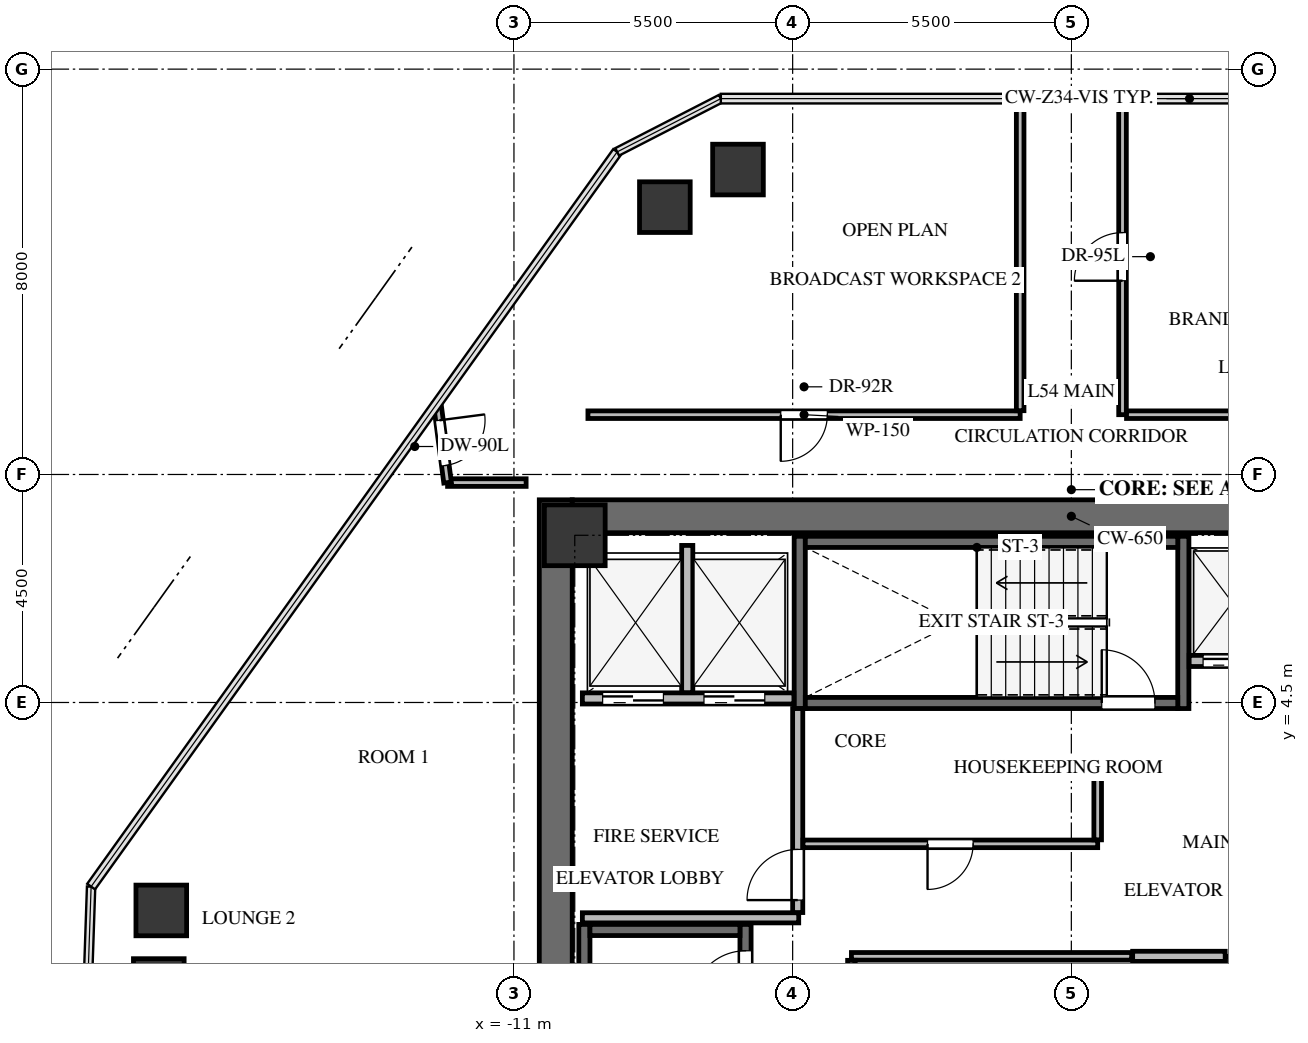
"""IFC4 building model, lengths in metres.
Left out: names, types, materials, properties, quantities, classifications, styles, units other than length and angle.
Written with IfcOpenShell. Run it as: python <this file> out.ifc"""

import sys

from ifc_helpers import new_model, si_unit, direction, frame, frame_2d, origin, origin_2d, place, context, subcontext, project, spatial, rectangle, extrude, source, transform, mapped, element, fill, save


model = new_model("IFC4")
c1 = context("Model", 3, precision=1e-05, world=origin(), true_north=direction((0.0, 1.0)))
c2 = subcontext(c1, "Body", "Model", "MODEL_VIEW")
j1 = project(units=[si_unit("LENGTHUNIT", "METRE"), si_unit("PLANEANGLEUNIT", "RADIAN")], contexts=[c1])
p1 = place(None, origin())
s1 = spatial("IfcSite", under=j1, at=p1, CompositionType="ELEMENT")
p2 = place(p1, origin())
s2 = spatial("IfcBuilding", under=s1, at=p2, CompositionType="ELEMENT")
p3 = place(p2, frame((0.0, 0.0, 196.9)))
s3 = spatial("IfcBuildingStorey", under=s2, at=p3, CompositionType="ELEMENT", Elevation=196.9)
p4 = place(p3, frame((-10.175, -8.5, 0.0), z_axis=(0.0, 0.0, 1.0), x_axis=(0.0, 1.0, 0.0)))
e1 = element("IfcWall", 1, at=p4, inside=s3, PredefinedType="SHEAR", context=c2, shape_type="SweptSolid", body=[
    extrude(rectangle(XDim=17.0, YDim=0.65, at=frame_2d((8.5, 0.0))), origin(), (0.0, 0.0, 1.0), 3.3),
])
p5 = place(p3, frame((-9.85, 8.175, 0.0), z_axis=(0.0, 0.0, 1.0), x_axis=(1.0, 0.0, 0.0)))
e2 = element("IfcWall", 2, at=p5, inside=s3, PredefinedType="SHEAR", context=c2, shape_type="SweptSolid", body=[
    extrude(rectangle(XDim=19.7, YDim=0.65, at=frame_2d((9.85, 0.0))), origin(), (0.0, 0.0, 1.0), 3.3),
])
p6 = place(p3, frame((-6.43, -7.77, -0.24), z_axis=(0.0, 0.0, 1.0), x_axis=(0.0, 1.0, 0.0)))
e3 = element("IfcWall", 3, at=p6, inside=s3, PredefinedType="SHEAR", context=c2, shape_type="SweptSolid", body=[
    extrude(rectangle(XDim=7.89, YDim=0.22, at=frame_2d((3.945, 0.0))), origin(), (0.0, 0.0, 1.0), 3.3),
])
p7 = place(p6, frame((6.32, 0.0, 0.0)))
e4 = element("IfcOpeningElement", 4, at=p7, cuts=e3, PredefinedType="OPENING", context=c2, shape_type="SweptSolid", body=[
    extrude(rectangle(XDim=1.05, YDim=2.15, at=frame_2d((0.525, 1.075))), frame((0.0, 0.12, 0.0), z_axis=(0.0, -1.0, 0.0), x_axis=(1.0, 0.0, 0.0)), (0.0, 0.0, 1.0), 0.24),
])
p8 = place(p3, frame((-9.61, 0.12, -0.24), z_axis=(0.0, 0.0, 1.0), x_axis=(0.0, -1.0, 0.0)))
e5 = element("IfcWall", 5, at=p8, inside=s3, PredefinedType="SHEAR", context=c2, shape_type="SweptSolid", body=[
    extrude(rectangle(XDim=7.89, YDim=0.22, at=frame_2d((3.945, 0.0))), origin(), (0.0, 0.0, 1.0), 3.3),
])
p9 = place(p3, frame((-6.54, 0.01, -0.24), z_axis=(0.0, 0.0, 1.0), x_axis=(-1.0, 0.0, 0.0)))
e6 = element("IfcWall", 6, at=p9, inside=s3, PredefinedType="SHEAR", context=c2, shape_type="SweptSolid", body=[
    extrude(rectangle(XDim=2.96, YDim=0.22, at=frame_2d((1.48, 0.0))), origin(), (0.0, 0.0, 1.0), 3.3),
])
for number, where, z_axis, x_axis in (
    (7, (2.21, 4.38, -0.24), (0.0, 0.0, 1.0), (0.0, 1.0, 0.0)),
    (8, (-5.36, 7.78, -0.24), (0.0, 0.0, 1.0), (0.0, -1.0, 0.0)),
):
    element("IfcWall", number, at=place(p3, frame(where, z_axis=z_axis, x_axis=x_axis)), inside=s3, PredefinedType="SHEAR", context=c2, shape_type="SweptSolid", body=[
        extrude(rectangle(XDim=3.4, YDim=0.22, at=frame_2d((1.7, 0.0))), origin(), (0.0, 0.0, 1.0), 3.3),
    ])
p10 = place(p3, frame((-5.25, 4.49, -0.24), z_axis=(0.0, 0.0, 1.0), x_axis=(1.0, 0.0, 0.0)))
e9 = element("IfcWall", 9, at=p10, inside=s3, PredefinedType="SHEAR", context=c2, shape_type="SweptSolid", body=[
    extrude(rectangle(XDim=7.35, YDim=0.22, at=frame_2d((3.675, 0.0))), origin(), (0.0, 0.0, 1.0), 3.3),
])
p11 = place(p10, frame((5.85, 0.0, 0.0)))
e10 = element("IfcOpeningElement", 10, at=p11, cuts=e9, PredefinedType="OPENING", context=c2, shape_type="SweptSolid", body=[
    extrude(rectangle(XDim=1.05, YDim=2.15, at=frame_2d((0.525, 1.075))), frame((0.0, 0.12, 0.0), z_axis=(0.0, -1.0, 0.0), x_axis=(1.0, 0.0, 0.0)), (0.0, 0.0, 1.0), 0.24),
])
p12 = place(p3, frame((2.1, 7.67, -0.24), z_axis=(0.0, 0.0, 1.0), x_axis=(-1.0, 0.0, 0.0)))
e11 = element("IfcWall", 11, at=p12, inside=s3, PredefinedType="SHEAR", context=c2, shape_type="SweptSolid", body=[
    extrude(rectangle(XDim=7.35, YDim=0.22, at=frame_2d((3.675, 0.0))), origin(), (0.0, 0.0, 1.0), 3.3),
])
m1 = source(origin(), c2, "Body", "SweptSolid", [
    extrude(rectangle(XDim=1.2, YDim=1.2, at=origin_2d()), origin(), (0.0, 0.0, 1.0), 3.3),
])
p13 = place(p3, frame((-9.8, 7.8, -0.24), z_axis=(0.0, 0.0, 1.0), x_axis=(1.0, 0.0, 0.0)))
e12 = element("IfcColumn", 12, at=p13, inside=s3, PredefinedType="COLUMN", context=c2, shape_type="MappedRepresentation", body=[
    mapped(m1, transform((0.0, 0.0, 0.0), x_axis=(1.0, 0.0, 0.0), y_axis=(0.0, 1.0, 0.0), z_axis=(0.0, 0.0, 1.0), scale=1.0)),
])
m2 = source(origin(), c2, "Body", "SweptSolid", [
    extrude(rectangle(XDim=1.0, YDim=1.0, at=origin_2d()), origin(), (0.0, 0.0, 1.0), 3.3),
])
for number, where, z_axis, x_axis in (
    (13, (-18.009, -1.057, -0.24), (0.0, 0.0, 1.0), (1.0, 0.0, 0.0)),
    (14, (-17.96, 0.396, -0.24), (0.0, 0.0, 1.0), (1.0, 0.0, 0.0)),
    (15, (-8.022, 14.276, -0.24), (0.0, 0.0, 1.0), (1.0, 0.0, 0.0)),
    (16, (-6.579, 15.018, -0.24), (0.0, 0.0, 1.0), (1.0, 0.0, 0.0)),
):
    element("IfcColumn", number, at=place(p3, frame(where, z_axis=z_axis, x_axis=x_axis)), inside=s3, PredefinedType="COLUMN", context=c2, shape_type="MappedRepresentation", body=[
        mapped(m2, transform((0.0, 0.0, 0.0), x_axis=(1.0, 0.0, 0.0), y_axis=(0.0, 1.0, 0.0), z_axis=(0.0, 0.0, 1.0), scale=1.0)),
    ])
p14 = place(p3, frame((-9.65, 4.58, 0.0), z_axis=(0.0, 0.0, 1.0), x_axis=(1.0, 0.0, 0.0)))
e17 = element("IfcWall", 17, at=p14, inside=s3, PredefinedType="SOLIDWALL", context=c2, shape_type="SweptSolid", body=[
    extrude(rectangle(XDim=4.175, YDim=0.22, at=frame_2d((2.087, 0.0))), origin(), (0.0, 0.0, 1.0), 3.045),
])
p15 = place(p14, frame((0.4, 0.0, 0.0)))
e18 = element("IfcOpeningElement", 18, at=p15, cuts=e17, PredefinedType="OPENING", context=c2, shape_type="SweptSolid", body=[
    extrude(rectangle(XDim=1.2, YDim=2.15, at=frame_2d((0.6, 1.075))), frame((0.0, 0.12, 0.0), z_axis=(0.0, -1.0, 0.0), x_axis=(1.0, 0.0, 0.0)), (0.0, 0.0, 1.0), 0.24),
])
p16 = place(p14, frame((2.4, 0.0, 0.0)))
e19 = element("IfcOpeningElement", 19, at=p16, cuts=e17, PredefinedType="OPENING", context=c2, shape_type="SweptSolid", body=[
    extrude(rectangle(XDim=1.2, YDim=2.15, at=frame_2d((0.6, 1.075))), frame((0.0, 0.12, 0.0), z_axis=(0.0, -1.0, 0.0), x_axis=(1.0, 0.0, 0.0)), (0.0, 0.0, 1.0), 0.24),
])
p17 = place(p3, frame((-7.58, 4.694, 0.0), z_axis=(0.0, 0.0, 1.0), x_axis=(0.0, 1.0, 0.0)))
e20 = element("IfcWall", 20, at=p17, inside=s3, PredefinedType="SOLIDWALL", context=c2, shape_type="SweptSolid", body=[
    extrude(rectangle(XDim=2.906, YDim=0.22, at=frame_2d((1.453, 0.0))), origin(), (0.0, 0.0, 1.0), 3.045),
])
p18 = place(p3, frame((-9.65, 0.25, 0.0), z_axis=(0.0, 0.0, 1.0), x_axis=(1.0, 0.0, 0.0)))
e21 = element("IfcWall", 21, at=p18, inside=s3, PredefinedType="SOLIDWALL", context=c2, shape_type="SweptSolid", body=[
    extrude(rectangle(XDim=4.27, YDim=0.2, at=frame_2d((2.135, 0.0))), origin(), (0.0, 0.0, 1.0), 3.045),
])
p19 = place(p3, frame((-5.4, 0.354, 0.0), z_axis=(0.0, 0.0, 1.0), x_axis=(0.0, 1.0, 0.0)))
e22 = element("IfcWall", 22, at=p19, inside=s3, PredefinedType="SOLIDWALL", context=c2, shape_type="SweptSolid", body=[
    extrude(rectangle(XDim=4.026, YDim=0.2, at=frame_2d((2.013, 0.0))), origin(), (0.0, 0.0, 1.0), 3.045),
])
p20 = place(p19, frame((0.246, 0.0, 0.0)))
e23 = element("IfcOpeningElement", 23, at=p20, cuts=e22, PredefinedType="OPENING", context=c2, shape_type="SweptSolid", body=[
    extrude(rectangle(XDim=1.0, YDim=2.15, at=frame_2d((0.5, 1.075))), frame((0.0, 0.11, 0.0), z_axis=(0.0, -1.0, 0.0), x_axis=(1.0, 0.0, 0.0)), (0.0, 0.0, 1.0), 0.22),
])
p21 = place(p3, frame((2.325, 5.32, 0.0), z_axis=(0.0, 0.0, 1.0), x_axis=(1.0, 0.0, 0.0)))
e24 = element("IfcWall", 24, at=p21, inside=s3, PredefinedType="SOLIDWALL", context=c2, shape_type="SweptSolid", body=[
    extrude(rectangle(XDim=7.325, YDim=0.22, at=frame_2d((3.663, 0.0))), origin(), (0.0, 0.0, 1.0), 3.045),
])
p22 = place(p21, frame((0.275, 0.0, 0.0)))
e25 = element("IfcOpeningElement", 25, at=p22, cuts=e24, PredefinedType="OPENING", context=c2, shape_type="SweptSolid", body=[
    extrude(rectangle(XDim=1.1, YDim=2.15, at=frame_2d((0.55, 1.075))), frame((0.0, 0.12, 0.0), z_axis=(0.0, -1.0, 0.0), x_axis=(1.0, 0.0, 0.0)), (0.0, 0.0, 1.0), 0.24),
])
p23 = place(p21, frame((2.045, 0.0, 0.0)))
e26 = element("IfcOpeningElement", 26, at=p23, cuts=e24, PredefinedType="OPENING", context=c2, shape_type="SweptSolid", body=[
    extrude(rectangle(XDim=1.1, YDim=2.15, at=frame_2d((0.55, 1.075))), frame((0.0, 0.12, 0.0), z_axis=(0.0, -1.0, 0.0), x_axis=(1.0, 0.0, 0.0)), (0.0, 0.0, 1.0), 0.24),
])
p24 = place(p21, frame((3.815, 0.0, 0.0)))
e27 = element("IfcOpeningElement", 27, at=p24, cuts=e24, PredefinedType="OPENING", context=c2, shape_type="SweptSolid", body=[
    extrude(rectangle(XDim=1.1, YDim=2.15, at=frame_2d((0.55, 1.075))), frame((0.0, 0.12, 0.0), z_axis=(0.0, -1.0, 0.0), x_axis=(1.0, 0.0, 0.0)), (0.0, 0.0, 1.0), 0.24),
])
p25 = place(p21, frame((5.585, 0.0, 0.0)))
e28 = element("IfcOpeningElement", 28, at=p25, cuts=e24, PredefinedType="OPENING", context=c2, shape_type="SweptSolid", body=[
    extrude(rectangle(XDim=1.1, YDim=2.15, at=frame_2d((0.55, 1.075))), frame((0.0, 0.12, 0.0), z_axis=(0.0, -1.0, 0.0), x_axis=(1.0, 0.0, 0.0)), (0.0, 0.0, 1.0), 0.24),
])
p26 = place(p3, frame((-4.34, -0.51, 0.0), z_axis=(0.0, 0.0, 1.0), x_axis=(1.0, 0.0, 0.0)))
e29 = element("IfcWall", 29, at=p26, inside=s3, PredefinedType="PARTITIONING", context=c2, shape_type="SweptSolid", body=[
    extrude(rectangle(XDim=5.53, YDim=0.15, at=frame_2d((2.765, 0.0))), origin(), (0.0, 0.0, 1.0), 3.045),
])
p27 = place(p3, frame((-4.34, -2.961, 0.0), z_axis=(0.0, 0.0, 1.0), x_axis=(0.0, 1.0, 0.0)))
e30 = element("IfcWall", 30, at=p27, inside=s3, PredefinedType="PARTITIONING", context=c2, shape_type="SweptSolid", body=[
    extrude(rectangle(XDim=2.372, YDim=0.15, at=frame_2d((1.186, 0.0))), origin(), (0.0, 0.0, 1.0), 3.045),
])
p28 = place(p3, frame((3.14, -0.51, 0.0), z_axis=(0.0, 0.0, 1.0), x_axis=(0.0, -1.0, 0.0)))
e31 = element("IfcWall", 31, at=p28, inside=s3, PredefinedType="SOLIDWALL", context=c2, shape_type="SweptSolid", body=[
    extrude(rectangle(XDim=2.53, YDim=0.2, at=frame_2d((1.265, 0.0))), origin(), (0.0, 0.0, 1.0), 3.045),
])
p29 = place(p28, frame((0.815, 0.0, 0.0)))
e32 = element("IfcOpeningElement", 32, at=p29, cuts=e31, PredefinedType="OPENING", context=c2, shape_type="SweptSolid", body=[
    extrude(rectangle(XDim=0.9, YDim=2.05, at=frame_2d((0.45, 1.025))), frame((0.0, 0.11, 0.0), z_axis=(0.0, -1.0, 0.0), x_axis=(1.0, 0.0, 0.0)), (0.0, 0.0, 1.0), 0.22),
])
p30 = place(p3, frame((1.21, -0.51, 0.0), z_axis=(0.0, 0.0, 1.0), x_axis=(1.0, 0.0, 0.0)))
e33 = element("IfcWall", 33, at=p30, inside=s3, PredefinedType="SOLIDWALL", context=c2, shape_type="SweptSolid", body=[
    extrude(rectangle(XDim=1.826, YDim=0.2, at=frame_2d((0.913, 0.0))), origin(), (0.0, 0.0, 1.0), 3.045),
])
p31 = place(p3, frame((0.52, 1.71, 0.0), z_axis=(0.0, 0.0, 1.0), x_axis=(-1.0, 0.0, 0.0)))
e34 = element("IfcWall", 34, at=p31, inside=s3, PredefinedType="PARTITIONING", context=c2, shape_type="SweptSolid", body=[
    extrude(rectangle(XDim=5.816, YDim=0.15, at=frame_2d((2.908, 0.0))), origin(), (0.0, 0.0, 1.0), 3.045),
])
p32 = place(p31, frame((2.458, 0.0, 0.0)))
e35 = element("IfcOpeningElement", 35, at=p32, cuts=e34, PredefinedType="OPENING", context=c2, shape_type="SweptSolid", body=[
    extrude(rectangle(XDim=0.9, YDim=2.05, at=frame_2d((0.45, 1.025))), frame((0.0, 0.085, 0.0), z_axis=(0.0, -1.0, 0.0), x_axis=(1.0, 0.0, 0.0)), (0.0, 0.0, 1.0), 0.17),
])
p33 = place(p3, frame((0.52, 3.3, 0.0), z_axis=(0.0, 0.0, 1.0), x_axis=(0.0, -1.0, 0.0)))
e36 = element("IfcWall", 36, at=p33, inside=s3, PredefinedType="PARTITIONING", context=c2, shape_type="SweptSolid", body=[
    extrude(rectangle(XDim=1.511, YDim=0.15, at=frame_2d((0.755, 0.0))), origin(), (0.0, 0.0, 1.0), 3.045),
])
p34 = place(p3, frame((-1.01, 10.18, 0.0), z_axis=(0.0, 0.0, 1.0), x_axis=(-1.0, 0.0, 0.0)))
e37 = element("IfcWall", 37, at=p34, inside=s3, PredefinedType="PARTITIONING", context=c2, shape_type="SweptSolid", body=[
    extrude(rectangle(XDim=8.53, YDim=0.15, at=frame_2d((4.265, 0.0))), origin(), (0.0, 0.0, 1.0), 2.242),
])
p35 = place(p34, frame((3.805, 0.0, 0.0)))
e38 = element("IfcOpeningElement", 38, at=p35, cuts=e37, PredefinedType="OPENING", context=c2, shape_type="SweptSolid", body=[
    extrude(rectangle(XDim=0.92, YDim=2.1, at=frame_2d((0.46, 1.05))), frame((0.0, 0.085, 0.0), z_axis=(0.0, -1.0, 0.0), x_axis=(1.0, 0.0, 0.0)), (0.0, 0.0, 1.0), 0.17),
])
p36 = place(p3, frame((-1.01, 16.418, 0.0), z_axis=(0.0, 0.0, 1.0), x_axis=(0.0, -1.0, 0.0)))
e39 = element("IfcWall", 39, at=p36, inside=s3, PredefinedType="PARTITIONING", context=c2, shape_type="SweptSolid", body=[
    extrude(rectangle(XDim=6.159, YDim=0.15, at=frame_2d((3.08, 0.0))), origin(), (0.0, 0.0, 1.0), 2.399),
])
p37 = place(p3, frame((1.01, 10.18, 0.0), z_axis=(0.0, 0.0, 1.0), x_axis=(0.0, 1.0, 0.0)))
e40 = element("IfcWall", 40, at=p37, inside=s3, PredefinedType="PARTITIONING", context=c2, shape_type="SweptSolid", body=[
    extrude(rectangle(XDim=6.238, YDim=0.15, at=frame_2d((3.119, 0.0))), origin(), (0.0, 0.0, 1.0), 2.399),
])
p38 = place(p37, frame((2.644, 0.0, 0.0)))
e41 = element("IfcOpeningElement", 41, at=p38, cuts=e40, PredefinedType="OPENING", context=c2, shape_type="SweptSolid", body=[
    extrude(rectangle(XDim=0.95, YDim=2.1, at=frame_2d((0.475, 1.05))), frame((0.0, 0.085, 0.0), z_axis=(0.0, -1.0, 0.0), x_axis=(1.0, 0.0, 0.0)), (0.0, 0.0, 1.0), 0.17),
])
p39 = place(p3, frame((5.54, 10.18, 0.0), z_axis=(0.0, 0.0, 1.0), x_axis=(-1.0, 0.0, 0.0)))
e42 = element("IfcWall", 42, at=p39, inside=s3, PredefinedType="PARTITIONING", context=c2, shape_type="SweptSolid", body=[
    extrude(rectangle(XDim=4.451, YDim=0.15, at=frame_2d((2.226, 0.0))), origin(), (0.0, 0.0, 1.0), 2.608),
])
p40 = place(p3, frame((-12.31, 8.84, 0.0), z_axis=(0.0, 0.0, 1.0), x_axis=(1.0, 0.0, 0.0)))
e43 = element("IfcWall", 43, at=p40, inside=s3, PredefinedType="PARTITIONING", context=c2, shape_type="SweptSolid", body=[
    extrude(rectangle(XDim=1.55, YDim=0.15, at=frame_2d((0.775, 0.0))), origin(), (0.0, 0.0, 1.0), 2.399),
])
p41 = place(p3, frame((-12.514, 10.406, 0.0), z_axis=(0.0, 0.0, 1.0), x_axis=(0.129378833178, -0.991595238757, 0.0)))
e44 = element("IfcWall", 44, at=p41, inside=s3, PredefinedType="PARTITIONING", context=c2, shape_type="SweptSolid", body=[
    extrude(rectangle(XDim=1.579, YDim=0.15, at=frame_2d((0.79, 0.0))), origin(), (0.0, 0.0, 1.0), 3.045),
])
p42 = place(p41, frame((0.34, 0.0, 0.0)))
e45 = element("IfcOpeningElement", 45, at=p42, cuts=e44, PredefinedType="OPENING", context=c2, shape_type="SweptSolid", body=[
    extrude(rectangle(XDim=0.9, YDim=2.05, at=frame_2d((0.45, 1.025))), frame((0.0, 0.085, 0.0), z_axis=(0.0, -1.0, 0.0), x_axis=(1.0, 0.0, 0.0)), (0.0, 0.0, 1.0), 0.17),
])
m3 = source(origin(), c2, "Body", "SweptSolid", [
    extrude(rectangle(XDim=1.05, YDim=2.15, at=frame_2d((0.525, 1.075))), frame((0.0, 0.025, 0.0), z_axis=(0.0, -1.0, 0.0), x_axis=(1.0, 0.0, 0.0)), (0.0, 0.0, 1.0), 0.05),
])
p43 = place(p7, origin())
e46 = element("IfcDoor", 46, at=p43, inside=s3, OperationType="SINGLE_SWING_LEFT", PredefinedType="DOOR", context=c2, shape_type="MappedRepresentation", body=[
    mapped(m3, transform((0.0, 0.0, 0.0), x_axis=(1.0, 0.0, 0.0), y_axis=(0.0, 1.0, 0.0), z_axis=(0.0, 0.0, 1.0), scale=1.0)),
])
fill(e4, e46)
p44 = place(p11, origin())
e47 = element("IfcDoor", 47, at=p44, inside=s3, OperationType="SINGLE_SWING_LEFT", PredefinedType="DOOR", context=c2, shape_type="MappedRepresentation", body=[
    mapped(m3, transform((0.0, 0.0, 0.0), x_axis=(1.0, 0.0, 0.0), y_axis=(0.0, 1.0, 0.0), z_axis=(0.0, 0.0, 1.0), scale=1.0)),
])
fill(e10, e47)
m4 = source(origin(), c2, "Body", "SweptSolid", [
    extrude(rectangle(XDim=1.2, YDim=2.15, at=frame_2d((0.6, 1.075))), frame((0.0, 0.025, 0.0), z_axis=(0.0, -1.0, 0.0), x_axis=(1.0, 0.0, 0.0)), (0.0, 0.0, 1.0), 0.05),
])
p45 = place(p15, origin())
e48 = element("IfcDoor", 48, at=p45, inside=s3, OperationType="DOUBLE_DOOR_SLIDING", PredefinedType="DOOR", context=c2, shape_type="MappedRepresentation", body=[
    mapped(m4, transform((0.0, 0.0, 0.0), x_axis=(1.0, 0.0, 0.0), y_axis=(0.0, 1.0, 0.0), z_axis=(0.0, 0.0, 1.0), scale=1.0)),
])
fill(e18, e48)
p46 = place(p16, origin())
e49 = element("IfcDoor", 49, at=p46, inside=s3, OperationType="DOUBLE_DOOR_SLIDING", PredefinedType="DOOR", context=c2, shape_type="MappedRepresentation", body=[
    mapped(m4, transform((0.0, 0.0, 0.0), x_axis=(1.0, 0.0, 0.0), y_axis=(0.0, 1.0, 0.0), z_axis=(0.0, 0.0, 1.0), scale=1.0)),
])
fill(e19, e49)
m5 = source(origin(), c2, "Body", "SweptSolid", [
    extrude(rectangle(XDim=1.0, YDim=2.15, at=frame_2d((0.5, 1.075))), frame((0.0, 0.025, 0.0), z_axis=(0.0, -1.0, 0.0), x_axis=(1.0, 0.0, 0.0)), (0.0, 0.0, 1.0), 0.05),
])
p47 = place(p20, origin())
e50 = element("IfcDoor", 50, at=p47, inside=s3, OperationType="SINGLE_SWING_LEFT", PredefinedType="DOOR", context=c2, shape_type="MappedRepresentation", body=[
    mapped(m5, transform((0.0, 0.0, 0.0), x_axis=(1.0, 0.0, 0.0), y_axis=(0.0, 1.0, 0.0), z_axis=(0.0, 0.0, 1.0), scale=1.0)),
])
fill(e23, e50)
m6 = source(origin(), c2, "Body", "SweptSolid", [
    extrude(rectangle(XDim=1.1, YDim=2.15, at=frame_2d((0.55, 1.075))), frame((0.0, 0.025, 0.0), z_axis=(0.0, -1.0, 0.0), x_axis=(1.0, 0.0, 0.0)), (0.0, 0.0, 1.0), 0.05),
])
p48 = place(p22, origin())
e51 = element("IfcDoor", 51, at=p48, inside=s3, OperationType="DOUBLE_DOOR_SLIDING", PredefinedType="DOOR", context=c2, shape_type="MappedRepresentation", body=[
    mapped(m6, transform((0.0, 0.0, 0.0), x_axis=(1.0, 0.0, 0.0), y_axis=(0.0, 1.0, 0.0), z_axis=(0.0, 0.0, 1.0), scale=1.0)),
])
fill(e25, e51)
m7 = source(origin(), c2, "Body", "SweptSolid", [
    extrude(rectangle(XDim=0.9, YDim=2.05, at=frame_2d((0.45, 1.025))), frame((0.0, 0.025, 0.0), z_axis=(0.0, -1.0, 0.0), x_axis=(1.0, 0.0, 0.0)), (0.0, 0.0, 1.0), 0.05),
])
p49 = place(p32, origin())
e52 = element("IfcDoor", 52, at=p49, inside=s3, OperationType="SINGLE_SWING_RIGHT", PredefinedType="DOOR", context=c2, shape_type="MappedRepresentation", body=[
    mapped(m7, transform((0.0, 0.0, 0.0), x_axis=(1.0, 0.0, 0.0), y_axis=(0.0, 1.0, 0.0), z_axis=(0.0, 0.0, 1.0), scale=1.0)),
])
fill(e35, e52)
m8 = source(origin(), c2, "Body", "SweptSolid", [
    extrude(rectangle(XDim=0.92, YDim=2.1, at=frame_2d((0.46, 1.05))), frame((0.0, 0.025, 0.0), z_axis=(0.0, -1.0, 0.0), x_axis=(1.0, 0.0, 0.0)), (0.0, 0.0, 1.0), 0.05),
])
p50 = place(p35, origin())
e53 = element("IfcDoor", 53, at=p50, inside=s3, OperationType="SINGLE_SWING_RIGHT", PredefinedType="DOOR", context=c2, shape_type="MappedRepresentation", body=[
    mapped(m8, transform((0.0, 0.0, 0.0), x_axis=(1.0, 0.0, 0.0), y_axis=(0.0, 1.0, 0.0), z_axis=(0.0, 0.0, 1.0), scale=1.0)),
])
fill(e38, e53)
m9 = source(origin(), c2, "Body", "SweptSolid", [
    extrude(rectangle(XDim=0.95, YDim=2.1, at=frame_2d((0.475, 1.05))), frame((0.0, 0.025, 0.0), z_axis=(0.0, -1.0, 0.0), x_axis=(1.0, 0.0, 0.0)), (0.0, 0.0, 1.0), 0.05),
])
p51 = place(p38, origin())
e54 = element("IfcDoor", 54, at=p51, inside=s3, OperationType="SINGLE_SWING_LEFT", PredefinedType="DOOR", context=c2, shape_type="MappedRepresentation", body=[
    mapped(m9, transform((0.0, 0.0, 0.0), x_axis=(1.0, 0.0, 0.0), y_axis=(0.0, 1.0, 0.0), z_axis=(0.0, 0.0, 1.0), scale=1.0)),
])
fill(e41, e54)
m10 = source(origin(), c2, "Body", "SweptSolid", [
    extrude(rectangle(XDim=0.9, YDim=2.05, at=frame_2d((0.45, 1.025))), frame((0.0, 0.025, 0.0), z_axis=(0.0, -1.0, 0.0), x_axis=(1.0, 0.0, 0.0)), (0.0, 0.0, 1.0), 0.05),
])
p52 = place(p42, origin())
e55 = element("IfcDoor", 55, at=p52, inside=s3, OperationType="SINGLE_SWING_LEFT", PredefinedType="DOOR", context=c2, shape_type="MappedRepresentation", body=[
    mapped(m10, transform((0.0, 0.0, 0.0), x_axis=(1.0, 0.0, 0.0), y_axis=(0.0, 1.0, 0.0), z_axis=(0.0, 0.0, 1.0), scale=1.0)),
])
fill(e45, e55)
save(model, sys.argv[1])
